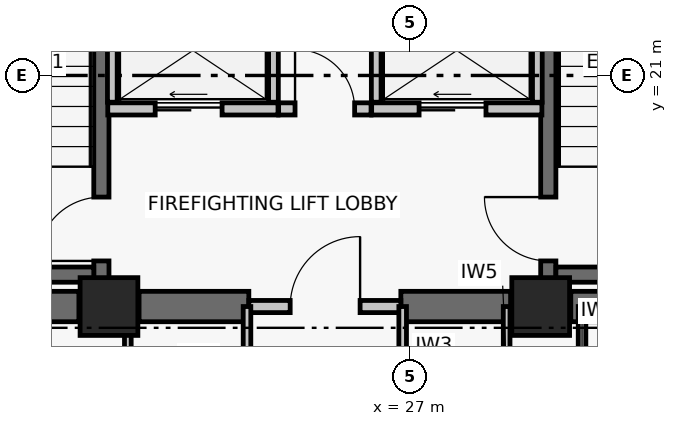
"""IFC4 building model, lengths in metres.
Left out: names, types, materials, properties, quantities, classifications, styles, units other than length and angle.
Written with IfcOpenShell. Run it as: python <this file> out.ifc"""

import sys

from ifc_helpers import new_model, si_unit, direction, frame, frame_2d, origin, origin_2d, place, context, subcontext, project, spatial, rectangle, extrude, element, fill, save


model = new_model("IFC4")
c1 = context("Model", 3, precision=1e-05, world=origin(), true_north=direction((0.0, 1.0)))
c2 = subcontext(c1, "Body", "Model", "MODEL_VIEW")
j1 = project(units=[si_unit("LENGTHUNIT", "METRE"), si_unit("PLANEANGLEUNIT", "RADIAN")], contexts=[c1])
p1 = place(None, origin())
s1 = spatial("IfcSite", under=j1, at=p1, CompositionType="ELEMENT")
p2 = place(p1, origin())
s2 = spatial("IfcBuilding", under=s1, at=p2, CompositionType="ELEMENT")
p3 = place(p2, frame((0.0, 0.0, 210.12)))
s3 = spatial("IfcBuildingStorey", under=s2, at=p3, CompositionType="ELEMENT", Elevation=210.12)
for number, where, z_axis, x_axis in (
    (1, (22.05, 17.2, 0.0), (0.0, 0.0, 1.0), (1.0, 0.0, 0.0)),
    (2, (29.15, 17.2, 0.0), (0.0, 0.0, 1.0), (1.0, 0.0, 0.0)),
):
    element("IfcColumn", number, at=place(p3, frame(where, z_axis=z_axis, x_axis=x_axis)), inside=s3, PredefinedType="COLUMN", context=c2, shape_type="SweptSolid", body=[
        extrude(rectangle(XDim=0.95, YDim=0.95, at=origin_2d()), origin(), (0.0, 0.0, 1.0), 3.72),
    ])
p4 = place(p3, frame((18.295, 17.2, 0.0), z_axis=(0.0, 0.0, 1.0), x_axis=(1.0, 0.0, 0.0)))
e3 = element("IfcWall", 3, at=p4, inside=s3, PredefinedType="SHEAR", context=c2, shape_type="SweptSolid", body=[
    extrude(rectangle(XDim=3.26, YDim=0.5, at=frame_2d((1.63, 0.0))), origin(), (0.0, 0.0, 1.0), 3.38),
])
p5 = place(p3, frame((22.545, 17.2, 0.0), z_axis=(0.0, 0.0, 1.0), x_axis=(1.0, 0.0, 0.0)))
e4 = element("IfcWall", 4, at=p5, inside=s3, PredefinedType="SHEAR", context=c2, shape_type="SweptSolid", body=[
    extrude(rectangle(XDim=1.805, YDim=0.5, at=frame_2d((0.903, 0.0))), origin(), (0.0, 0.0, 1.0), 3.38),
])
p6 = place(p3, frame((26.85, 17.2, 0.0), z_axis=(0.0, 0.0, 1.0), x_axis=(1.0, 0.0, 0.0)))
e5 = element("IfcWall", 5, at=p6, inside=s3, PredefinedType="SHEAR", context=c2, shape_type="SweptSolid", body=[
    extrude(rectangle(XDim=1.805, YDim=0.5, at=frame_2d((0.902, 0.0))), origin(), (0.0, 0.0, 1.0), 3.38),
])
p7 = place(p3, frame((29.645, 17.2, 0.0), z_axis=(0.0, 0.0, 1.0), x_axis=(1.0, 0.0, 0.0)))
e6 = element("IfcWall", 6, at=p7, inside=s3, PredefinedType="SHEAR", context=c2, shape_type="SweptSolid", body=[
    extrude(rectangle(XDim=3.26, YDim=0.5, at=frame_2d((1.63, 0.0))), origin(), (0.0, 0.0, 1.0), 3.38),
])
p8 = place(p3, frame((21.925, 17.6, 0.0), z_axis=(0.0, 0.0, 1.0), x_axis=(0.0, 1.0, 0.0)))
e7 = element("IfcWall", 7, at=p8, inside=s3, PredefinedType="SHEAR", context=c2, shape_type="SweptSolid", body=[
    extrude(rectangle(XDim=8.8, YDim=0.25, at=frame_2d((4.4, 0.0))), origin(), (0.0, 0.0, 1.0), 3.38),
])
p9 = place(p8, frame((0.35, 0.0, 0.0)))
e8 = element("IfcOpeningElement", 8, at=p9, cuts=e7, PredefinedType="OPENING", context=c2, shape_type="SweptSolid", body=[
    extrude(rectangle(XDim=1.05, YDim=2.08, at=frame_2d((0.525, 1.04))), frame((0.0, 0.135, 0.0), z_axis=(0.0, -1.0, 0.0), x_axis=(1.0, 0.0, 0.0)), (0.0, 0.0, 1.0), 0.27),
])
p10 = place(p3, frame((18.304, 17.725, 0.0), z_axis=(0.0, 0.0, 1.0), x_axis=(1.0, 0.0, 0.0)))
e9 = element("IfcWall", 9, at=p10, inside=s3, PredefinedType="SHEAR", context=c2, shape_type="SweptSolid", body=[
    extrude(rectangle(XDim=3.496, YDim=0.25, at=frame_2d((1.748, 0.0))), origin(), (0.0, 0.0, 1.0), 3.38),
])
p11 = place(p3, frame((29.275, 17.6, 0.0), z_axis=(0.0, 0.0, 1.0), x_axis=(0.0, 1.0, 0.0)))
e10 = element("IfcWall", 10, at=p11, inside=s3, PredefinedType="SHEAR", context=c2, shape_type="SweptSolid", body=[
    extrude(rectangle(XDim=8.8, YDim=0.25, at=frame_2d((4.4, 0.0))), origin(), (0.0, 0.0, 1.0), 3.38),
])
p12 = place(p11, frame((0.35, 0.0, 0.0)))
e11 = element("IfcOpeningElement", 11, at=p12, cuts=e10, PredefinedType="OPENING", context=c2, shape_type="SweptSolid", body=[
    extrude(rectangle(XDim=1.05, YDim=2.08, at=frame_2d((0.525, 1.04))), frame((0.0, 0.135, 0.0), z_axis=(0.0, -1.0, 0.0), x_axis=(1.0, 0.0, 0.0)), (0.0, 0.0, 1.0), 0.27),
])
p13 = place(p3, frame((29.4, 17.725, 0.0), z_axis=(0.0, 0.0, 1.0), x_axis=(1.0, 0.0, 0.0)))
e12 = element("IfcWall", 12, at=p13, inside=s3, PredefinedType="SHEAR", context=c2, shape_type="SweptSolid", body=[
    extrude(rectangle(XDim=3.496, YDim=0.25, at=frame_2d((1.748, 0.0))), origin(), (0.0, 0.0, 1.0), 3.38),
])
p14 = place(p3, frame((24.35, 17.2, 0.0), z_axis=(0.0, 0.0, 1.0), x_axis=(1.0, 0.0, 0.0)))
e13 = element("IfcWall", 13, at=p14, inside=s3, PredefinedType="PARTITIONING", context=c2, shape_type="SweptSolid", body=[
    extrude(rectangle(XDim=2.5, YDim=0.2, at=frame_2d((1.25, 0.0))), origin(), (0.0, 0.0, 1.0), 2.51),
])
p15 = place(p14, frame((0.68, 0.0, 0.0)))
e14 = element("IfcOpeningElement", 14, at=p15, cuts=e13, PredefinedType="OPENING", context=c2, shape_type="SweptSolid", body=[
    extrude(rectangle(XDim=1.15, YDim=2.08, at=frame_2d((0.575, 1.04))), frame((0.0, 0.11, 0.0), z_axis=(0.0, -1.0, 0.0), x_axis=(1.0, 0.0, 0.0)), (0.0, 0.0, 1.0), 0.22),
])
p16 = place(p3, frame((24.84, 20.45, 0.0), z_axis=(0.0, 0.0, 1.0), x_axis=(1.0, 0.0, 0.0)))
e15 = element("IfcWall", 15, at=p16, inside=s3, PredefinedType="PARTITIONING", context=c2, shape_type="SweptSolid", body=[
    extrude(rectangle(XDim=1.52, YDim=0.2, at=frame_2d((0.76, 0.0))), origin(), (0.0, 0.0, 1.0), 3.38),
])
p17 = place(p16, frame((0.27, 0.0, 0.0)))
e16 = element("IfcOpeningElement", 16, at=p17, cuts=e15, PredefinedType="OPENING", context=c2, shape_type="SweptSolid", body=[
    extrude(rectangle(XDim=0.98, YDim=2.06, at=frame_2d((0.49, 1.03))), frame((0.0, 0.11, 0.0), z_axis=(0.0, -1.0, 0.0), x_axis=(1.0, 0.0, 0.0)), (0.0, 0.0, 1.0), 0.22),
])
p18 = place(p3, frame((22.03, 20.45, 0.0), z_axis=(0.0, 0.0, 1.0), x_axis=(1.0, 0.0, 0.0)))
e17 = element("IfcWall", 17, at=p18, inside=s3, PredefinedType="PARTITIONING", context=c2, shape_type="SweptSolid", body=[
    extrude(rectangle(XDim=2.8, YDim=0.2, at=frame_2d((1.4, 0.0))), origin(), (0.0, 0.0, 1.0), 3.38),
])
p19 = place(p18, frame((0.78, 0.0, 0.0)))
e18 = element("IfcOpeningElement", 18, at=p19, cuts=e17, PredefinedType="OPENING", context=c2, shape_type="SweptSolid", body=[
    extrude(rectangle(XDim=1.1, YDim=2.08, at=frame_2d((0.55, 1.04))), frame((0.0, 0.11, 0.0), z_axis=(0.0, -1.0, 0.0), x_axis=(1.0, 0.0, 0.0)), (0.0, 0.0, 1.0), 0.22),
])
p20 = place(p3, frame((26.37, 20.45, 0.0), z_axis=(0.0, 0.0, 1.0), x_axis=(1.0, 0.0, 0.0)))
e19 = element("IfcWall", 19, at=p20, inside=s3, PredefinedType="PARTITIONING", context=c2, shape_type="SweptSolid", body=[
    extrude(rectangle(XDim=2.8, YDim=0.2, at=frame_2d((1.4, 0.0))), origin(), (0.0, 0.0, 1.0), 3.38),
])
p21 = place(p20, frame((0.78, 0.0, 0.0)))
e20 = element("IfcOpeningElement", 20, at=p21, cuts=e19, PredefinedType="OPENING", context=c2, shape_type="SweptSolid", body=[
    extrude(rectangle(XDim=1.1, YDim=2.08, at=frame_2d((0.55, 1.04))), frame((0.0, 0.11, 0.0), z_axis=(0.0, -1.0, 0.0), x_axis=(1.0, 0.0, 0.0)), (0.0, 0.0, 1.0), 0.22),
])
for number, where, z_axis, x_axis in (
    (21, (22.105, 20.56, 0.0), (0.0, 0.0, 1.0), (0.0, 1.0, 0.0)),
    (22, (24.755, 20.56, 0.0), (0.0, 0.0, 1.0), (0.0, 1.0, 0.0)),
):
    element("IfcWall", number, at=place(p3, frame(where, z_axis=z_axis, x_axis=x_axis)), inside=s3, PredefinedType="PARTITIONING", context=c2, shape_type="SweptSolid", body=[
        extrude(rectangle(XDim=1.71, YDim=0.16, at=frame_2d((0.855, 0.0))), origin(), (0.0, 0.0, 1.0), 3.38),
    ])
p22 = place(p3, frame((29.095, 20.56, 0.0), z_axis=(0.0, 0.0, 1.0), x_axis=(0.0, 1.0, 0.0)))
e23 = element("IfcWall", 23, at=p22, inside=s3, PredefinedType="PARTITIONING", context=c2, shape_type="SweptSolid", body=[
    extrude(rectangle(XDim=3.58, YDim=0.16, at=frame_2d((1.79, 0.0))), origin(), (0.0, 0.0, 1.0), 3.38),
])
p23 = place(p3, frame((26.445, 20.56, 0.0), z_axis=(0.0, 0.0, 1.0), x_axis=(0.0, 1.0, 0.0)))
e24 = element("IfcWall", 24, at=p23, inside=s3, PredefinedType="PARTITIONING", context=c2, shape_type="SweptSolid", body=[
    extrude(rectangle(XDim=1.71, YDim=0.16, at=frame_2d((0.855, 0.0))), origin(), (0.0, 0.0, 1.0), 3.38),
])
p24 = place(p3, frame((22.36, 14.95, 0.0), z_axis=(0.0, 0.0, 1.0), x_axis=(0.0, 1.0, 0.0)))
e25 = element("IfcWall", 25, at=p24, inside=s3, PredefinedType="PARTITIONING", context=c2, shape_type="SweptSolid", body=[
    extrude(rectangle(XDim=2.25, YDim=0.11, at=frame_2d((1.125, 0.0))), origin(), (0.0, 0.0, 1.0), 2.51),
])
for number, where, z_axis, x_axis in (
    (26, (24.32, 14.95, 0.0), (0.0, 0.0, 1.0), (0.0, 1.0, 0.0)),
    (27, (26.88, 14.95, 0.0), (0.0, 0.0, 1.0), (0.0, 1.0, 0.0)),
):
    element("IfcWall", number, at=place(p3, frame(where, z_axis=z_axis, x_axis=x_axis)), inside=s3, PredefinedType="PARTITIONING", context=c2, shape_type="SweptSolid", body=[
        extrude(rectangle(XDim=2.25, YDim=0.125, at=frame_2d((1.125, 0.0))), origin(), (0.0, 0.0, 1.0), 2.51),
    ])
p25 = place(p3, frame((28.59, 14.95, 0.0), z_axis=(0.0, 0.0, 1.0), x_axis=(0.0, 1.0, 0.0)))
e28 = element("IfcWall", 28, at=p25, inside=s3, PredefinedType="PARTITIONING", context=c2, shape_type="SweptSolid", body=[
    extrude(rectangle(XDim=2.25, YDim=0.11, at=frame_2d((1.125, 0.0))), origin(), (0.0, 0.0, 1.0), 2.51),
])
p26 = place(p3, frame((29.83, 14.95, 0.0), z_axis=(0.0, 0.0, 1.0), x_axis=(0.0, 1.0, 0.0)))
e29 = element("IfcWall", 29, at=p26, inside=s3, PredefinedType="PARTITIONING", context=c2, shape_type="SweptSolid", body=[
    extrude(rectangle(XDim=2.25, YDim=0.125, at=frame_2d((1.125, 0.0))), origin(), (0.0, 0.0, 1.0), 2.51),
])
p27 = place(p9, origin())
e30 = element("IfcDoor", 30, at=p27, inside=s3, OperationType="SINGLE_SWING_LEFT", PredefinedType="DOOR", context=c2, shape_type="SweptSolid", body=[
    extrude(rectangle(XDim=1.05, YDim=2.08, at=frame_2d((0.525, 1.04))), frame((0.0, 0.025, 0.0), z_axis=(0.0, -1.0, 0.0), x_axis=(1.0, 0.0, 0.0)), (0.0, 0.0, 1.0), 0.05),
])
fill(e8, e30)
p28 = place(p12, origin())
e31 = element("IfcDoor", 31, at=p28, inside=s3, OperationType="SINGLE_SWING_RIGHT", PredefinedType="DOOR", context=c2, shape_type="SweptSolid", body=[
    extrude(rectangle(XDim=1.05, YDim=2.08, at=frame_2d((0.525, 1.04))), frame((0.0, 0.025, 0.0), z_axis=(0.0, -1.0, 0.0), x_axis=(1.0, 0.0, 0.0)), (0.0, 0.0, 1.0), 0.05),
])
fill(e11, e31)
p29 = place(p15, origin())
e32 = element("IfcDoor", 32, at=p29, inside=s3, OperationType="SINGLE_SWING_RIGHT", PredefinedType="DOOR", context=c2, shape_type="SweptSolid", body=[
    extrude(rectangle(XDim=1.15, YDim=2.08, at=frame_2d((0.575, 1.04))), frame((0.0, 0.025, 0.0), z_axis=(0.0, -1.0, 0.0), x_axis=(1.0, 0.0, 0.0)), (0.0, 0.0, 1.0), 0.05),
])
fill(e14, e32)
p30 = place(p17, origin())
e33 = element("IfcDoor", 33, at=p30, inside=s3, OperationType="SINGLE_SWING_LEFT", PredefinedType="DOOR", context=c2, shape_type="SweptSolid", body=[
    extrude(rectangle(XDim=0.98, YDim=2.06, at=frame_2d((0.49, 1.03))), frame((0.0, 0.025, 0.0), z_axis=(0.0, -1.0, 0.0), x_axis=(1.0, 0.0, 0.0)), (0.0, 0.0, 1.0), 0.05),
])
fill(e16, e33)
p31 = place(p19, origin())
e34 = element("IfcDoor", 34, at=p31, inside=s3, OperationType="DOUBLE_DOOR_SLIDING", PredefinedType="DOOR", context=c2, shape_type="SweptSolid", body=[
    extrude(rectangle(XDim=1.1, YDim=2.08, at=frame_2d((0.55, 1.04))), frame((0.0, 0.025, 0.0), z_axis=(0.0, -1.0, 0.0), x_axis=(1.0, 0.0, 0.0)), (0.0, 0.0, 1.0), 0.05),
])
fill(e18, e34)
p32 = place(p21, origin())
e35 = element("IfcDoor", 35, at=p32, inside=s3, OperationType="DOUBLE_DOOR_SLIDING", PredefinedType="DOOR", context=c2, shape_type="SweptSolid", body=[
    extrude(rectangle(XDim=1.1, YDim=2.08, at=frame_2d((0.55, 1.04))), frame((0.0, 0.025, 0.0), z_axis=(0.0, -1.0, 0.0), x_axis=(1.0, 0.0, 0.0)), (0.0, 0.0, 1.0), 0.05),
])
fill(e20, e35)
save(model, sys.argv[1])
